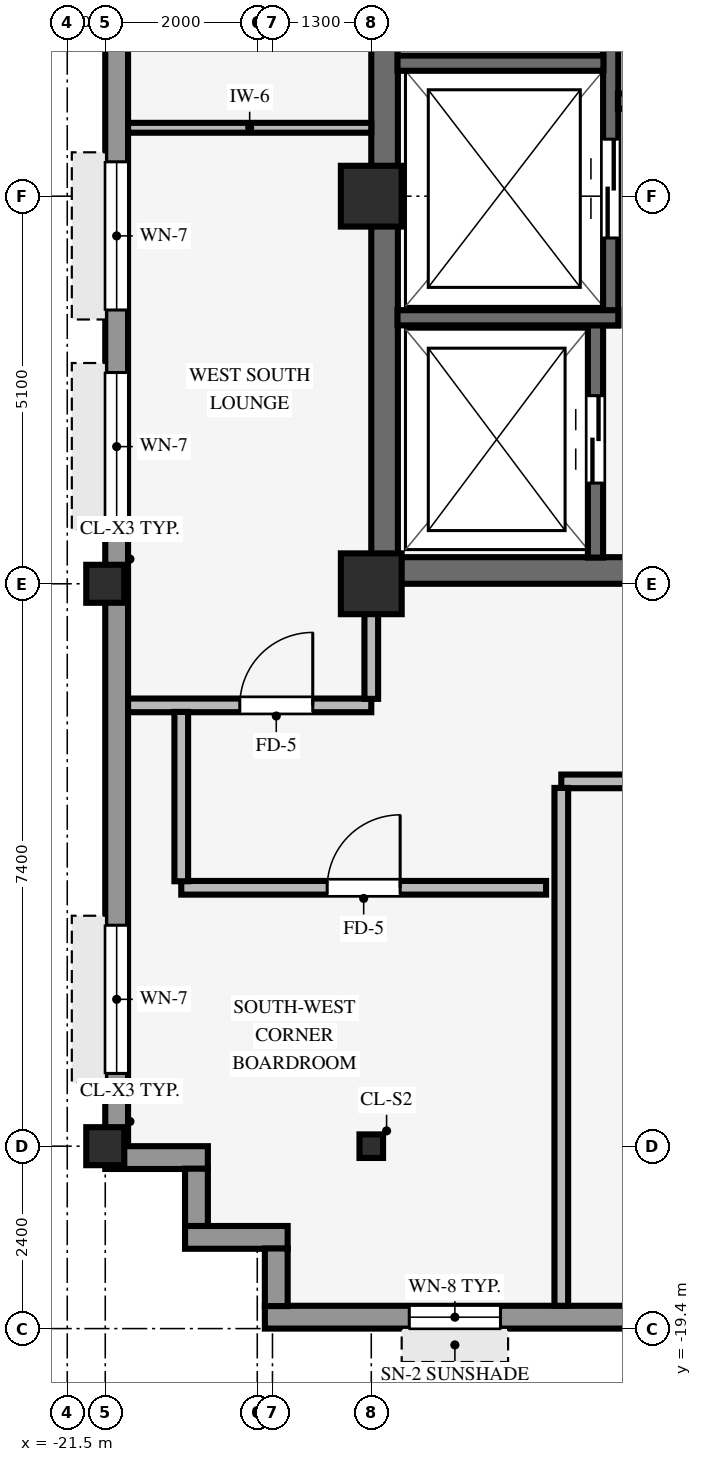
"""IFC4 building model, lengths in metres.
Left out: names, types, materials, properties, quantities, classifications, styles, units other than length and angle.
Written with IfcOpenShell. Run it as: python <this file> out.ifc"""

import sys

from ifc_helpers import new_model, si_unit, direction, frame, frame_2d, origin, origin_2d, place, context, subcontext, project, spatial, rectangle, hollow_rectangle, i_section, extrude, source, transform, mapped, element, fill, save


model = new_model("IFC4")
c1 = context("Model", 3, precision=1e-05, world=origin(), true_north=direction((0.0, 1.0)))
c2 = subcontext(c1, "Body", "Model", "MODEL_VIEW")
j1 = project(units=[si_unit("LENGTHUNIT", "METRE"), si_unit("PLANEANGLEUNIT", "RADIAN")], contexts=[c1])
p1 = place(None, origin())
s1 = spatial("IfcSite", under=j1, at=p1, CompositionType="ELEMENT")
p2 = place(p1, origin())
s2 = spatial("IfcBuilding", under=s1, at=p2, CompositionType="ELEMENT")
p3 = place(p2, frame((0.0, 0.0, 272.55)))
s3 = spatial("IfcBuildingStorey", under=s2, at=p3, CompositionType="ELEMENT", Elevation=272.55)
p4 = place(p3, frame((-17.5, -9.425, 0.0), z_axis=(0.0, 0.0, 1.0), x_axis=(1.0, 0.0, 0.0)))
e1 = element("IfcWall", 1, at=p4, inside=s3, PredefinedType="SHEAR", context=c2, shape_type="SweptSolid", body=[
    extrude(rectangle(XDim=8.5, YDim=0.35, at=frame_2d((4.25, 0.0))), origin(), (0.0, 0.0, 1.0), 3.37),
])
p5 = place(p3, frame((-17.325, -9.255, 0.0), z_axis=(0.0, 0.0, 1.0), x_axis=(0.0, 1.0, 0.0)))
e2 = element("IfcWall", 2, at=p5, inside=s3, PredefinedType="SHEAR", context=c2, shape_type="SweptSolid", body=[
    extrude(rectangle(XDim=18.51, YDim=0.35, at=frame_2d((9.255, 0.0))), origin(), (0.0, 0.0, 1.0), 3.37),
])
for number, where, z_axis, x_axis in (
    (3, (-17.5, -9.6, 0.0), (0.0, 0.0, 1.0), (1.0, 0.0, 0.0)),
    (4, (-17.5, -4.5, 0.0), (0.0, 0.0, 1.0), (1.0, 0.0, 0.0)),
):
    element("IfcColumn", number, at=place(p3, frame(where, z_axis=z_axis, x_axis=x_axis)), inside=s3, PredefinedType="COLUMN", context=c2, shape_type="SweptSolid", body=[
        extrude(rectangle(XDim=0.8, YDim=0.8, at=origin_2d()), origin(), (0.0, 0.0, 1.0), 3.37),
    ])
for number, where, z_axis, x_axis in (
    (5, (-21.0, -17.0, 0.0), (0.0, 0.0, 1.0), (1.0, 0.0, 0.0)),
    (6, (-21.0, -9.6, 0.0), (0.0, 0.0, 1.0), (1.0, 0.0, 0.0)),
):
    element("IfcColumn", number, at=place(p3, frame(where, z_axis=z_axis, x_axis=x_axis)), inside=s3, PredefinedType="COLUMN", context=c2, shape_type="SweptSolid", body=[
        extrude(hollow_rectangle(XDim=0.5, YDim=0.5, WallThickness=0.032, InnerFilletRadius=0.032, OuterFilletRadius=0.064, at=origin_2d()), origin(), (0.0, 0.0, 1.0), 3.37),
    ])
p6 = place(p3, frame((-17.5, -17.0, 0.0), z_axis=(0.0, 0.0, 1.0), x_axis=(1.0, 0.0, 0.0)))
e7 = element("IfcColumn", 7, at=p6, inside=s3, PredefinedType="COLUMN", context=c2, shape_type="SweptSolid", body=[
    extrude(i_section(OverallWidth=0.31, OverallDepth=0.31, WebThickness=0.015, FlangeThickness=0.015, FilletRadius=0.015, at=origin_2d()), origin(), (0.0, 0.0, 1.0), 3.37),
])
p7 = place(p3, frame((-18.9, -19.25, 0.0), z_axis=(0.0, 0.0, 1.0), x_axis=(1.0, 0.0, 0.0)))
e8 = element("IfcWall", 8, at=p7, inside=s3, PredefinedType="STANDARD", context=c2, shape_type="SweptSolid", body=[
    extrude(rectangle(XDim=35.6, YDim=0.3, at=frame_2d((17.8, 0.0))), origin(), (0.0, 0.0, 1.0), 2.705),
])
p8 = place(p7, frame((1.9, 0.0, 0.8)))
e9 = element("IfcOpeningElement", 9, at=p8, cuts=e8, PredefinedType="OPENING", context=c2, shape_type="SweptSolid", body=[
    extrude(rectangle(XDim=1.2, YDim=1.48, at=frame_2d((0.6, 0.74))), frame((0.0, 0.16, 0.0), z_axis=(0.0, -1.0, 0.0), x_axis=(1.0, 0.0, 0.0)), (0.0, 0.0, 1.0), 0.32),
])
p9 = place(p7, frame((7.6, 0.0, 0.8)))
e10 = element("IfcOpeningElement", 10, at=p9, cuts=e8, PredefinedType="OPENING", context=c2, shape_type="SweptSolid", body=[
    extrude(rectangle(XDim=1.2, YDim=1.48, at=frame_2d((0.6, 0.74))), frame((0.0, 0.16, 0.0), z_axis=(0.0, -1.0, 0.0), x_axis=(1.0, 0.0, 0.0)), (0.0, 0.0, 1.0), 0.32),
])
p10 = place(p7, frame((12.85, 0.0, 0.8)))
e11 = element("IfcOpeningElement", 11, at=p10, cuts=e8, PredefinedType="OPENING", context=c2, shape_type="SweptSolid", body=[
    extrude(rectangle(XDim=1.2, YDim=1.48, at=frame_2d((0.6, 0.74))), frame((0.0, 0.16, 0.0), z_axis=(0.0, -1.0, 0.0), x_axis=(1.0, 0.0, 0.0)), (0.0, 0.0, 1.0), 0.32),
])
p11 = place(p7, frame((22.0, 0.0, 0.8)))
e12 = element("IfcOpeningElement", 12, at=p11, cuts=e8, PredefinedType="OPENING", context=c2, shape_type="SweptSolid", body=[
    extrude(rectangle(XDim=1.2, YDim=1.48, at=frame_2d((0.6, 0.74))), frame((0.0, 0.16, 0.0), z_axis=(0.0, -1.0, 0.0), x_axis=(1.0, 0.0, 0.0)), (0.0, 0.0, 1.0), 0.32),
])
p12 = place(p7, frame((25.9, 0.0, 0.8)))
e13 = element("IfcOpeningElement", 13, at=p12, cuts=e8, PredefinedType="OPENING", context=c2, shape_type="SweptSolid", body=[
    extrude(rectangle(XDim=1.2, YDim=1.48, at=frame_2d((0.6, 0.74))), frame((0.0, 0.16, 0.0), z_axis=(0.0, -1.0, 0.0), x_axis=(1.0, 0.0, 0.0)), (0.0, 0.0, 1.0), 0.32),
])
p13 = place(p7, frame((31.6, 0.0, 0.8)))
e14 = element("IfcOpeningElement", 14, at=p13, cuts=e8, PredefinedType="OPENING", context=c2, shape_type="SweptSolid", body=[
    extrude(rectangle(XDim=1.2, YDim=1.48, at=frame_2d((0.6, 0.74))), frame((0.0, 0.16, 0.0), z_axis=(0.0, -1.0, 0.0), x_axis=(1.0, 0.0, 0.0)), (0.0, 0.0, 1.0), 0.32),
])
p14 = place(p3, frame((-20.85, -17.004, 0.0), z_axis=(0.0, 0.0, 1.0), x_axis=(0.0, 1.0, 0.0)))
e15 = element("IfcWall", 15, at=p14, inside=s3, PredefinedType="STANDARD", context=c2, shape_type="SweptSolid", body=[
    extrude(rectangle(XDim=34.008, YDim=0.3, at=frame_2d((17.004, 0.0))), origin(), (0.0, 0.0, 1.0), 2.705),
])
p15 = place(p14, frame((0.961, 0.0, 0.8)))
e16 = element("IfcOpeningElement", 16, at=p15, cuts=e15, PredefinedType="OPENING", context=c2, shape_type="SweptSolid", body=[
    extrude(rectangle(XDim=1.95, YDim=1.48, at=frame_2d((0.975, 0.74))), frame((0.0, 0.16, 0.0), z_axis=(0.0, -1.0, 0.0), x_axis=(1.0, 0.0, 0.0)), (0.0, 0.0, 1.0), 0.32),
])
p16 = place(p14, frame((8.234, 0.0, 0.8)))
e17 = element("IfcOpeningElement", 17, at=p16, cuts=e15, PredefinedType="OPENING", context=c2, shape_type="SweptSolid", body=[
    extrude(rectangle(XDim=1.95, YDim=1.48, at=frame_2d((0.975, 0.74))), frame((0.0, 0.16, 0.0), z_axis=(0.0, -1.0, 0.0), x_axis=(1.0, 0.0, 0.0)), (0.0, 0.0, 1.0), 0.32),
])
p17 = place(p14, frame((11.006, 0.0, 0.8)))
e18 = element("IfcOpeningElement", 18, at=p17, cuts=e15, PredefinedType="OPENING", context=c2, shape_type="SweptSolid", body=[
    extrude(rectangle(XDim=1.95, YDim=1.48, at=frame_2d((0.975, 0.74))), frame((0.0, 0.16, 0.0), z_axis=(0.0, -1.0, 0.0), x_axis=(1.0, 0.0, 0.0)), (0.0, 0.0, 1.0), 0.32),
])
p18 = place(p14, frame((20.602, 0.0, 0.8)))
e19 = element("IfcOpeningElement", 19, at=p18, cuts=e15, PredefinedType="OPENING", context=c2, shape_type="SweptSolid", body=[
    extrude(rectangle(XDim=1.95, YDim=1.48, at=frame_2d((0.975, 0.74))), frame((0.0, 0.16, 0.0), z_axis=(0.0, -1.0, 0.0), x_axis=(1.0, 0.0, 0.0)), (0.0, 0.0, 1.0), 0.32),
])
p19 = place(p14, frame((23.824, 0.0, 0.8)))
e20 = element("IfcOpeningElement", 20, at=p19, cuts=e15, PredefinedType="OPENING", context=c2, shape_type="SweptSolid", body=[
    extrude(rectangle(XDim=1.95, YDim=1.48, at=frame_2d((0.975, 0.74))), frame((0.0, 0.16, 0.0), z_axis=(0.0, -1.0, 0.0), x_axis=(1.0, 0.0, 0.0)), (0.0, 0.0, 1.0), 0.32),
])
p20 = place(p14, frame((31.097, 0.0, 0.8)))
e21 = element("IfcOpeningElement", 21, at=p20, cuts=e15, PredefinedType="OPENING", context=c2, shape_type="SweptSolid", body=[
    extrude(rectangle(XDim=1.95, YDim=1.48, at=frame_2d((0.975, 0.74))), frame((0.0, 0.16, 0.0), z_axis=(0.0, -1.0, 0.0), x_axis=(1.0, 0.0, 0.0)), (0.0, 0.0, 1.0), 0.32),
])
p21 = place(p3, frame((-21.0, -17.15, 0.0), z_axis=(0.0, 0.0, 1.0), x_axis=(1.0, 0.0, 0.0)))
e22 = element("IfcWall", 22, at=p21, inside=s3, PredefinedType="STANDARD", context=c2, shape_type="SweptSolid", body=[
    extrude(rectangle(XDim=1.35, YDim=0.3, at=frame_2d((0.675, 0.0))), origin(), (0.0, 0.0, 1.0), 2.892),
])
p22 = place(p3, frame((-19.8, -18.054, 0.0), z_axis=(0.0, 0.0, 1.0), x_axis=(0.0, 1.0, 0.0)))
e23 = element("IfcWall", 23, at=p22, inside=s3, PredefinedType="STANDARD", context=c2, shape_type="SweptSolid", body=[
    extrude(rectangle(XDim=0.758, YDim=0.3, at=frame_2d((0.379, 0.0))), origin(), (0.0, 0.0, 1.0), 2.892),
])
p23 = place(p3, frame((-19.95, -18.2, 0.0), z_axis=(0.0, 0.0, 1.0), x_axis=(1.0, 0.0, 0.0)))
e24 = element("IfcWall", 24, at=p23, inside=s3, PredefinedType="STANDARD", context=c2, shape_type="SweptSolid", body=[
    extrude(rectangle(XDim=1.35, YDim=0.3, at=frame_2d((0.675, 0.0))), origin(), (0.0, 0.0, 1.0), 2.892),
])
p24 = place(p3, frame((-18.75, -19.104, 0.0), z_axis=(0.0, 0.0, 1.0), x_axis=(0.0, 1.0, 0.0)))
e25 = element("IfcWall", 25, at=p24, inside=s3, PredefinedType="STANDARD", context=c2, shape_type="SweptSolid", body=[
    extrude(rectangle(XDim=0.758, YDim=0.3, at=frame_2d((0.379, 0.0))), origin(), (0.0, 0.0, 1.0), 2.892),
])
p25 = place(p3, frame((-14.55, -9.255, 0.0), z_axis=(0.0, 0.0, 1.0), x_axis=(0.0, 1.0, 0.0)))
e26 = element("IfcWall", 26, at=p25, inside=s3, PredefinedType="SHEAR", context=c2, shape_type="SweptSolid", body=[
    extrude(rectangle(XDim=3.06, YDim=0.2, at=frame_2d((1.53, 0.0))), origin(), (0.0, 0.0, 1.0), 3.37),
])
p26 = place(p25, frame((0.98, 0.0, 0.0)))
e27 = element("IfcOpeningElement", 27, at=p26, cuts=e26, PredefinedType="OPENING", context=c2, shape_type="SweptSolid", body=[
    extrude(rectangle(XDim=1.15, YDim=2.15, at=frame_2d((0.575, 1.075))), frame((0.0, 0.11, 0.0), z_axis=(0.0, -1.0, 0.0), x_axis=(1.0, 0.0, 0.0)), (0.0, 0.0, 1.0), 0.22),
])
p27 = place(p3, frame((-14.35, -6.2, 0.0), z_axis=(0.0, 0.0, 1.0), x_axis=(0.0, 1.0, 0.0)))
e28 = element("IfcWall", 28, at=p27, inside=s3, PredefinedType="SHEAR", context=c2, shape_type="SweptSolid", body=[
    extrude(rectangle(XDim=7.105, YDim=0.2, at=frame_2d((3.552, 0.0))), origin(), (0.0, 0.0, 1.0), 3.37),
])
p28 = place(p27, frame((5.69, 0.0, 0.0), z_axis=(0.0, 0.0, 1.0), x_axis=(-1.0, 0.0, 0.0)))
e29 = element("IfcOpeningElement", 29, at=p28, cuts=e28, PredefinedType="OPENING", context=c2, shape_type="SweptSolid", body=[
    extrude(rectangle(XDim=0.88, YDim=2.1, at=frame_2d((0.44, 1.05))), frame((0.0, 0.11, 0.0), z_axis=(0.0, -1.0, 0.0), x_axis=(1.0, 0.0, 0.0)), (0.0, 0.0, 1.0), 0.22),
])
p29 = place(p27, frame((1.15, 0.0, 0.0)))
e30 = element("IfcOpeningElement", 30, at=p29, cuts=e28, PredefinedType="OPENING", context=c2, shape_type="SweptSolid", body=[
    extrude(rectangle(XDim=1.3, YDim=2.2, at=frame_2d((0.65, 1.1))), frame((0.0, 0.11, 0.0), z_axis=(0.0, -1.0, 0.0), x_axis=(1.0, 0.0, 0.0)), (0.0, 0.0, 1.0), 0.22),
])
p30 = place(p3, frame((-17.155, -6.1, 0.0), z_axis=(0.0, 0.0, 1.0), x_axis=(1.0, 0.0, 0.0)))
e31 = element("IfcWall", 31, at=p30, inside=s3, PredefinedType="SHEAR", context=c2, shape_type="SweptSolid", body=[
    extrude(rectangle(XDim=2.905, YDim=0.2, at=frame_2d((1.453, 0.0))), origin(), (0.0, 0.0, 1.0), 3.37),
])
p31 = place(p3, frame((-17.155, -2.75, 0.0), z_axis=(0.0, 0.0, 1.0), x_axis=(1.0, 0.0, 0.0)))
e32 = element("IfcWall", 32, at=p31, inside=s3, PredefinedType="SHEAR", context=c2, shape_type="SweptSolid", body=[
    extrude(rectangle(XDim=2.71, YDim=0.2, at=frame_2d((1.355, 0.0))), origin(), (0.0, 0.0, 1.0), 3.37),
])
p32 = place(p3, frame((-14.255, -3.25, 0.0), z_axis=(0.0, 0.0, 1.0), x_axis=(1.0, 0.0, 0.0)))
e33 = element("IfcWall", 33, at=p32, inside=s3, PredefinedType="SHEAR", context=c2, shape_type="SweptSolid", body=[
    extrude(rectangle(XDim=2.56, YDim=0.2, at=frame_2d((1.28, 0.0))), origin(), (0.0, 0.0, 1.0), 3.37),
])
p33 = place(p32, frame((0.705, 0.0, 0.0)))
e34 = element("IfcOpeningElement", 34, at=p33, cuts=e33, PredefinedType="OPENING", context=c2, shape_type="SweptSolid", body=[
    extrude(rectangle(XDim=1.2, YDim=2.15, at=frame_2d((0.6, 1.075))), frame((0.0, 0.11, 0.0), z_axis=(0.0, -1.0, 0.0), x_axis=(1.0, 0.0, 0.0)), (0.0, 0.0, 1.0), 0.22),
])
p34 = place(p3, frame((-20.0, -13.6, 0.0), z_axis=(0.0, 0.0, 1.0), x_axis=(1.0, 0.0, 0.0)))
e35 = element("IfcWall", 35, at=p34, inside=s3, PredefinedType="PARTITIONING", context=c2, shape_type="SweptSolid", body=[
    extrude(rectangle(XDim=4.8, YDim=0.18, at=frame_2d((2.4, 0.0))), origin(), (0.0, 0.0, 1.0), 3.038),
])
p35 = place(p34, frame((1.92, 0.0, 0.0)))
e36 = element("IfcOpeningElement", 36, at=p35, cuts=e35, PredefinedType="OPENING", context=c2, shape_type="SweptSolid", body=[
    extrude(rectangle(XDim=0.96, YDim=2.1, at=frame_2d((0.48, 1.05))), frame((0.0, 0.1, 0.0), z_axis=(0.0, -1.0, 0.0), x_axis=(1.0, 0.0, 0.0)), (0.0, 0.0, 1.0), 0.2),
])
p36 = place(p3, frame((-15.0, -12.2, 0.0), z_axis=(0.0, 0.0, 1.0), x_axis=(1.0, 0.0, 0.0)))
e37 = element("IfcWall", 37, at=p36, inside=s3, PredefinedType="PARTITIONING", context=c2, shape_type="SweptSolid", body=[
    extrude(rectangle(XDim=6.0, YDim=0.18, at=frame_2d((3.0, 0.0))), origin(), (0.0, 0.0, 1.0), 3.36),
])
p37 = place(p36, frame((2.52, 0.0, 0.0)))
e38 = element("IfcOpeningElement", 38, at=p37, cuts=e37, PredefinedType="OPENING", context=c2, shape_type="SweptSolid", body=[
    extrude(rectangle(XDim=0.96, YDim=2.1, at=frame_2d((0.48, 1.05))), frame((0.0, 0.1, 0.0), z_axis=(0.0, -1.0, 0.0), x_axis=(1.0, 0.0, 0.0)), (0.0, 0.0, 1.0), 0.2),
])
p38 = place(p3, frame((-20.7, -11.2, 0.0), z_axis=(0.0, 0.0, 1.0), x_axis=(1.0, 0.0, 0.0)))
e39 = element("IfcWall", 39, at=p38, inside=s3, PredefinedType="PARTITIONING", context=c2, shape_type="SweptSolid", body=[
    extrude(rectangle(XDim=3.2, YDim=0.18, at=frame_2d((1.6, 0.0))), origin(), (0.0, 0.0, 1.0), 3.36),
])
p39 = place(p38, frame((1.47, 0.0, 0.0)))
e40 = element("IfcOpeningElement", 40, at=p39, cuts=e39, PredefinedType="OPENING", context=c2, shape_type="SweptSolid", body=[
    extrude(rectangle(XDim=0.96, YDim=2.1, at=frame_2d((0.48, 1.05))), frame((0.0, 0.1, 0.0), z_axis=(0.0, -1.0, 0.0), x_axis=(1.0, 0.0, 0.0)), (0.0, 0.0, 1.0), 0.2),
])
p40 = place(p3, frame((-20.7, -3.6, 0.0), z_axis=(0.0, 0.0, 1.0), x_axis=(1.0, 0.0, 0.0)))
e41 = element("IfcWall", 41, at=p40, inside=s3, PredefinedType="PARTITIONING", context=c2, shape_type="SweptSolid", body=[
    extrude(rectangle(XDim=3.2, YDim=0.13, at=frame_2d((1.6, 0.0))), origin(), (0.0, 0.0, 1.0), 3.36),
])
p41 = place(p3, frame((-20.0, -13.514, 0.0), z_axis=(0.0, 0.0, 1.0), x_axis=(0.0, 1.0, 0.0)))
e42 = element("IfcWall", 42, at=p41, inside=s3, PredefinedType="PARTITIONING", context=c2, shape_type="SweptSolid", body=[
    extrude(rectangle(XDim=2.228, YDim=0.18, at=frame_2d((1.114, 0.0))), origin(), (0.0, 0.0, 1.0), 3.36),
])
p42 = place(p3, frame((-17.5, -11.114, 0.0), z_axis=(0.0, 0.0, 1.0), x_axis=(0.0, 1.0, 0.0)))
e43 = element("IfcWall", 43, at=p42, inside=s3, PredefinedType="PARTITIONING", context=c2, shape_type="SweptSolid", body=[
    extrude(rectangle(XDim=1.118, YDim=0.18, at=frame_2d((0.559, 0.0))), origin(), (0.0, 0.0, 1.0), 2.892),
])
p43 = place(p3, frame((-15.0, -19.1, 0.0), z_axis=(0.0, 0.0, 1.0), x_axis=(0.0, 1.0, 0.0)))
e44 = element("IfcWall", 44, at=p43, inside=s3, PredefinedType="PARTITIONING", context=c2, shape_type="SweptSolid", body=[
    extrude(rectangle(XDim=6.814, YDim=0.18, at=frame_2d((3.407, 0.0))), origin(), (0.0, 0.0, 1.0), 3.36),
])
m1 = source(origin(), c2, "Body", "SweptSolid", [
    extrude(rectangle(XDim=1.2, YDim=1.48, at=frame_2d((0.6, 0.74))), frame((0.0, 0.03, 0.0), z_axis=(0.0, -1.0, 0.0), x_axis=(1.0, 0.0, 0.0)), (0.0, 0.0, 1.0), 0.06),
])
p44 = place(p8, origin())
e45 = element("IfcWindow", 45, at=p44, inside=s3, PartitioningType="SINGLE_PANEL", PredefinedType="WINDOW", context=c2, shape_type="MappedRepresentation", body=[
    mapped(m1, transform((0.0, 0.0, 0.0), scale=1.0)),
])
fill(e9, e45)
m2 = source(origin(), c2, "Body", "SweptSolid", [
    extrude(rectangle(XDim=1.95, YDim=1.48, at=frame_2d((0.975, 0.74))), frame((0.0, 0.03, 0.0), z_axis=(0.0, -1.0, 0.0), x_axis=(1.0, 0.0, 0.0)), (0.0, 0.0, 1.0), 0.06),
])
p45 = place(p15, origin())
e46 = element("IfcWindow", 46, at=p45, inside=s3, PartitioningType="SINGLE_PANEL", PredefinedType="WINDOW", context=c2, shape_type="MappedRepresentation", body=[
    mapped(m2, transform((0.0, 0.0, 0.0), scale=1.0)),
])
fill(e16, e46)
p46 = place(p16, origin())
e47 = element("IfcWindow", 47, at=p46, inside=s3, PartitioningType="SINGLE_PANEL", PredefinedType="WINDOW", context=c2, shape_type="MappedRepresentation", body=[
    mapped(m2, transform((0.0, 0.0, 0.0), scale=1.0)),
])
fill(e17, e47)
p47 = place(p17, origin())
e48 = element("IfcWindow", 48, at=p47, inside=s3, PartitioningType="SINGLE_PANEL", PredefinedType="WINDOW", context=c2, shape_type="MappedRepresentation", body=[
    mapped(m2, transform((0.0, 0.0, 0.0), scale=1.0)),
])
fill(e18, e48)
m3 = source(origin(), c2, "Body", "SweptSolid", [
    extrude(rectangle(XDim=1.15, YDim=2.15, at=frame_2d((0.575, 1.075))), frame((0.0, 0.025, 0.0), z_axis=(0.0, -1.0, 0.0), x_axis=(1.0, 0.0, 0.0)), (0.0, 0.0, 1.0), 0.05),
])
p48 = place(p26, origin())
e49 = element("IfcDoor", 49, at=p48, inside=s3, OperationType="DOUBLE_DOOR_SLIDING", PredefinedType="DOOR", context=c2, shape_type="MappedRepresentation", body=[
    mapped(m3, transform((0.0, 0.0, 0.0), scale=1.0)),
])
fill(e27, e49)
m4 = source(origin(), c2, "Body", "SweptSolid", [
    extrude(rectangle(XDim=1.3, YDim=2.2, at=frame_2d((0.65, 1.1))), frame((0.0, 0.025, 0.0), z_axis=(0.0, -1.0, 0.0), x_axis=(1.0, 0.0, 0.0)), (0.0, 0.0, 1.0), 0.05),
])
p49 = place(p29, origin())
e50 = element("IfcDoor", 50, at=p49, inside=s3, OperationType="DOUBLE_DOOR_SLIDING", PredefinedType="DOOR", context=c2, shape_type="MappedRepresentation", body=[
    mapped(m4, transform((0.0, 0.0, 0.0), scale=1.0)),
])
fill(e30, e50)
m5 = source(origin(), c2, "Body", "SweptSolid", [
    extrude(rectangle(XDim=0.96, YDim=2.1, at=frame_2d((0.48, 1.05))), frame((0.0, 0.025, 0.0), z_axis=(0.0, -1.0, 0.0), x_axis=(1.0, 0.0, 0.0)), (0.0, 0.0, 1.0), 0.05),
])
p50 = place(p35, origin())
e51 = element("IfcDoor", 51, at=p50, inside=s3, OperationType="SINGLE_SWING_RIGHT", PredefinedType="DOOR", context=c2, shape_type="MappedRepresentation", body=[
    mapped(m5, transform((0.0, 0.0, 0.0), scale=1.0)),
])
fill(e36, e51)
p51 = place(p39, origin())
e52 = element("IfcDoor", 52, at=p51, inside=s3, OperationType="SINGLE_SWING_RIGHT", PredefinedType="DOOR", context=c2, shape_type="MappedRepresentation", body=[
    mapped(m5, transform((0.0, 0.0, 0.0), scale=1.0)),
])
fill(e40, e52)
save(model, sys.argv[1])
